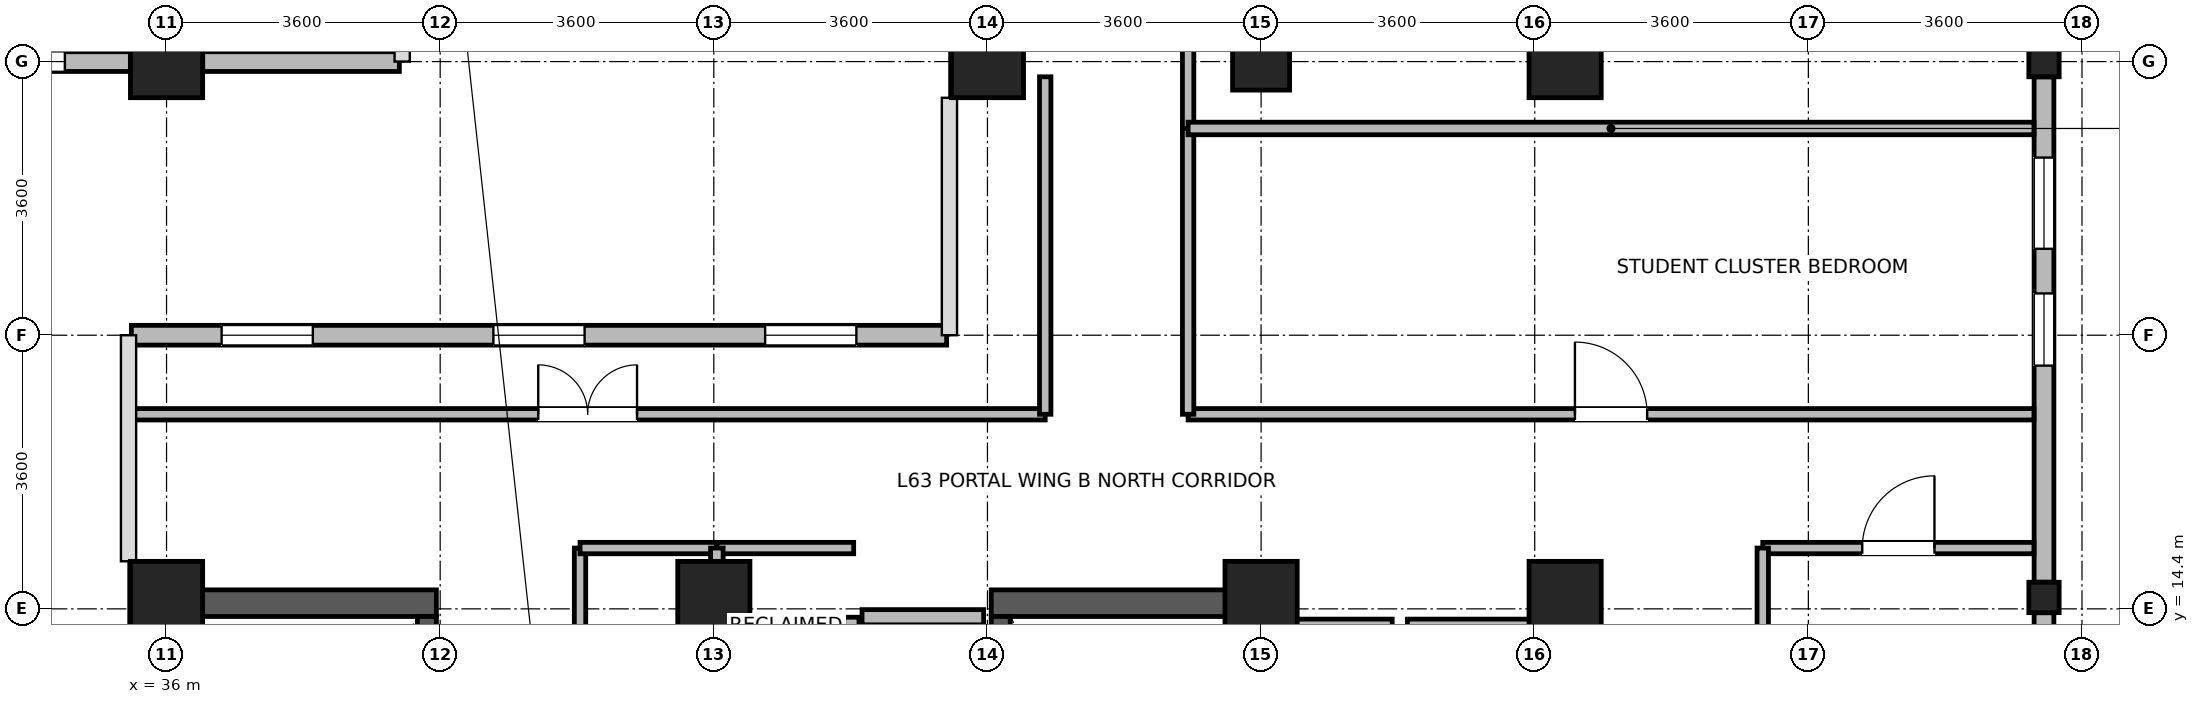
"""IFC4 building model, lengths in metres.
Left out: names, types, materials, properties, quantities, classifications, styles, units other than length and angle.
Written with IfcOpenShell. Run it as: python <this file> out.ifc"""

import sys

from ifc_helpers import new_model, si_unit, direction, frame, frame_2d, origin, origin_2d, place, context, subcontext, project, spatial, rectangle, i_section, extrude, source, transform, mapped, element, fill, save


model = new_model("IFC4")
c1 = context("Model", 3, precision=1e-05, world=origin(), true_north=direction((0.0, 1.0)))
c2 = subcontext(c1, "Body", "Model", "MODEL_VIEW")
j1 = project(units=[si_unit("LENGTHUNIT", "METRE"), si_unit("PLANEANGLEUNIT", "RADIAN")], contexts=[c1])
p1 = place(None, origin())
s1 = spatial("IfcSite", under=j1, at=p1, CompositionType="ELEMENT")
p2 = place(p1, origin())
s2 = spatial("IfcBuilding", under=s1, at=p2, CompositionType="ELEMENT")
p3 = place(p2, frame((0.0, 0.0, 246.2)))
s3 = spatial("IfcBuildingStorey", under=s2, at=p3, CompositionType="ELEMENT", Elevation=246.2)
for number, where, z_axis, x_axis in (
    (1, (36.175, 6.95, 0.0), (0.0, 0.0, 1.0), (0.0, 1.0, 0.0)),
    (2, (50.225, 6.95, 0.0), (0.0, 0.0, 1.0), (0.0, 1.0, 0.0)),
):
    element("IfcWall", number, at=place(p3, frame(where, z_axis=z_axis, x_axis=x_axis)), inside=s3, PredefinedType="SHEAR", context=c2, shape_type="SweptSolid", body=[
        extrude(rectangle(XDim=7.7, YDim=0.35, at=frame_2d((3.85, 0.0))), origin(), (0.0, 0.0, 1.0), 3.28),
    ])
for number, where, z_axis, x_axis in (
    (3, (36.35, 14.475, 0.0), (0.0, 0.0, 1.0), (1.0, 0.0, 0.0)),
    (4, (46.85, 14.475, 0.0), (0.0, 0.0, 1.0), (1.0, 0.0, 0.0)),
):
    element("IfcWall", number, at=place(p3, frame(where, z_axis=z_axis, x_axis=x_axis)), inside=s3, PredefinedType="SHEAR", context=c2, shape_type="SweptSolid", body=[
        extrude(rectangle(XDim=3.2, YDim=0.35, at=frame_2d((1.6, 0.0))), origin(), (0.0, 0.0, 1.0), 3.28),
    ])
p4 = place(p3, frame((39.425, 7.3, 0.0), z_axis=(0.0, 0.0, 1.0), x_axis=(0.0, 1.0, 0.0)))
e5 = element("IfcWall", 5, at=p4, inside=s3, PredefinedType="SHEAR", context=c2, shape_type="SweptSolid", body=[
    extrude(rectangle(XDim=7.0, YDim=0.25, at=frame_2d((3.5, 0.0))), origin(), (0.0, 0.0, 1.0), 3.28),
])
p5 = place(p4, frame((0.15, 0.0, 0.0)))
e6 = element("IfcOpeningElement", 6, at=p5, cuts=e5, PredefinedType="OPENING", context=c2, shape_type="SweptSolid", body=[
    extrude(rectangle(XDim=1.1, YDim=2.08, at=frame_2d((0.55, 1.04))), frame((0.0, 0.135, 0.0), z_axis=(0.0, -1.0, 0.0), x_axis=(1.0, 0.0, 0.0)), (0.0, 0.0, 1.0), 0.27),
])
p6 = place(p3, frame((46.975, 7.3, 0.0), z_axis=(0.0, 0.0, 1.0), x_axis=(0.0, 1.0, 0.0)))
e7 = element("IfcWall", 7, at=p6, inside=s3, PredefinedType="SHEAR", context=c2, shape_type="SweptSolid", body=[
    extrude(rectangle(XDim=7.0, YDim=0.25, at=frame_2d((3.5, 0.0))), origin(), (0.0, 0.0, 1.0), 3.28),
])
p7 = place(p6, frame((0.15, 0.0, 0.0)))
e8 = element("IfcOpeningElement", 8, at=p7, cuts=e7, PredefinedType="OPENING", context=c2, shape_type="SweptSolid", body=[
    extrude(rectangle(XDim=1.1, YDim=2.08, at=frame_2d((0.55, 1.04))), frame((0.0, 0.135, 0.0), z_axis=(0.0, -1.0, 0.0), x_axis=(1.0, 0.0, 0.0)), (0.0, 0.0, 1.0), 0.27),
])
m1 = source(origin(), c2, "Body", "SweptSolid", [
    extrude(rectangle(XDim=0.95, YDim=0.95, at=origin_2d()), origin(), (0.0, 0.0, 1.0), 3.7),
])
for number, where, z_axis, x_axis in (
    (9, (36.0, 21.6, 0.0), (0.0, 0.0, 1.0), (1.0, 0.0, 0.0)),
    (10, (46.8, 21.6, 0.0), (0.0, 0.0, 1.0), (1.0, 0.0, 0.0)),
    (11, (36.0, 14.55, 0.0), (0.0, 0.0, 1.0), (1.0, 0.0, 0.0)),
    (12, (43.2, 14.55, 0.0), (0.0, 0.0, 1.0), (1.0, 0.0, 0.0)),
    (13, (50.4, 14.55, 0.0), (0.0, 0.0, 1.0), (1.0, 0.0, 0.0)),
):
    element("IfcColumn", number, at=place(p3, frame(where, z_axis=z_axis, x_axis=x_axis)), inside=s3, PredefinedType="COLUMN", context=c2, shape_type="MappedRepresentation", body=[
        mapped(m1, transform((0.0, 0.0, 0.0), x_axis=(1.0, 0.0, 0.0), y_axis=(0.0, 1.0, 0.0), z_axis=(0.0, 0.0, 1.0), scale=1.0)),
    ])
m2 = source(origin(), c2, "Body", "SweptSolid", [
    extrude(rectangle(XDim=0.75, YDim=0.75, at=origin_2d()), origin(), (0.0, 0.0, 1.0), 3.7),
])
p8 = place(p3, frame((50.4, 21.6, 0.0), z_axis=(0.0, 0.0, 1.0), x_axis=(1.0, 0.0, 0.0)))
e14 = element("IfcColumn", 14, at=p8, inside=s3, PredefinedType="PILASTER", context=c2, shape_type="MappedRepresentation", body=[
    mapped(m2, transform((0.0, 0.0, 0.0), x_axis=(1.0, 0.0, 0.0), y_axis=(0.0, 1.0, 0.0), z_axis=(0.0, 0.0, 1.0), scale=1.0)),
])
for number, where, z_axis, x_axis in (
    (15, (54.4, 14.55, 0.0), (0.0, 0.0, 1.0), (1.0, 0.0, 0.0)),
    (16, (54.4, 21.6, 0.0), (0.0, 0.0, 1.0), (1.0, 0.0, 0.0)),
):
    element("IfcColumn", number, at=place(p3, frame(where, z_axis=z_axis, x_axis=x_axis)), inside=s3, PredefinedType="COLUMN", context=c2, shape_type="MappedRepresentation", body=[
        mapped(m1, transform((0.0, 0.0, 0.0), x_axis=(1.0, 0.0, 0.0), y_axis=(0.0, 1.0, 0.0), z_axis=(0.0, 0.0, 1.0), scale=1.0)),
    ])
m3 = source(origin(), c2, "Body", "SweptSolid", [
    extrude(i_section(OverallWidth=0.399, OverallDepth=0.4, WebThickness=0.017, FlangeThickness=0.023, FilletRadius=0.015, at=origin_2d()), origin(), (0.0, 0.0, 1.0), 3.7),
])
for number, where, z_axis, x_axis in (
    (17, (60.7, 14.55, 0.0), (0.0, 0.0, 1.0), (1.0, 0.0, 0.0)),
    (18, (60.7, 21.6, 0.0), (0.0, 0.0, 1.0), (1.0, 0.0, 0.0)),
):
    element("IfcColumn", number, at=place(p3, frame(where, z_axis=z_axis, x_axis=x_axis)), inside=s3, PredefinedType="COLUMN", context=c2, shape_type="MappedRepresentation", body=[
        mapped(m3, transform((0.0, 0.0, 0.0), x_axis=(1.0, 0.0, 0.0), y_axis=(0.0, 1.0, 0.0), z_axis=(0.0, 0.0, 1.0), scale=1.0)),
    ])
p9 = place(p3, frame((35.524, 21.6, 0.0), z_axis=(0.0, 0.0, 1.0), x_axis=(-1.0, 0.0, 0.0)))
e19 = element("IfcWall", 19, at=p9, inside=s3, PredefinedType="STANDARD", context=c2, shape_type="SweptSolid", body=[
    extrude(rectangle(XDim=2.923, YDim=0.26, at=frame_2d((1.462, 0.0))), origin(), (0.0, 0.0, 1.0), 2.86),
])
p10 = place(p9, frame((0.862, 0.0, 0.85)))
e20 = element("IfcOpeningElement", 20, at=p10, cuts=e19, PredefinedType="OPENING", context=c2, shape_type="SweptSolid", body=[
    extrude(rectangle(XDim=1.2, YDim=1.75, at=frame_2d((0.6, 0.875))), frame((0.0, 0.14, 0.0), z_axis=(0.0, -1.0, 0.0), x_axis=(1.0, 0.0, 0.0)), (0.0, 0.0, 1.0), 0.28),
])
p11 = place(p3, frame((39.063, 21.6, 0.0), z_axis=(0.0, 0.0, 1.0), x_axis=(-1.0, 0.0, 0.0)))
e21 = element("IfcWall", 21, at=p11, inside=s3, PredefinedType="STANDARD", context=c2, shape_type="SweptSolid", body=[
    extrude(rectangle(XDim=2.587, YDim=0.26, at=frame_2d((1.293, 0.0))), origin(), (0.0, 0.0, 1.0), 1.46),
])
p12 = place(p3, frame((60.7, 14.349, 0.0), z_axis=(0.0, 0.0, 1.0), x_axis=(0.0, -1.0, 0.0)))
e22 = element("IfcWall", 22, at=p12, inside=s3, PredefinedType="STANDARD", context=c2, shape_type="SweptSolid", body=[
    extrude(rectangle(XDim=5.079, YDim=0.26, at=frame_2d((2.54, 0.0))), origin(), (0.0, 0.0, 1.0), 2.86),
])
p13 = place(p12, frame((1.939, 0.0, 0.85)))
e23 = element("IfcOpeningElement", 23, at=p13, cuts=e22, PredefinedType="OPENING", context=c2, shape_type="SweptSolid", body=[
    extrude(rectangle(XDim=1.2, YDim=1.75, at=frame_2d((0.6, 0.875))), frame((0.0, 0.14, 0.0), z_axis=(0.0, -1.0, 0.0), x_axis=(1.0, 0.0, 0.0)), (0.0, 0.0, 1.0), 0.28),
])
p14 = place(p3, frame((60.7, 21.399, 0.0), z_axis=(0.0, 0.0, 1.0), x_axis=(0.0, -1.0, 0.0)))
e24 = element("IfcWall", 24, at=p14, inside=s3, PredefinedType="STANDARD", context=c2, shape_type="SweptSolid", body=[
    extrude(rectangle(XDim=6.648, YDim=0.26, at=frame_2d((3.324, 0.0))), origin(), (0.0, 0.0, 1.0), 2.86),
])
p15 = place(p14, frame((1.062, 0.0, 0.85)))
e25 = element("IfcOpeningElement", 25, at=p15, cuts=e24, PredefinedType="OPENING", context=c2, shape_type="SweptSolid", body=[
    extrude(rectangle(XDim=1.2, YDim=1.75, at=frame_2d((0.6, 0.875))), frame((0.0, 0.14, 0.0), z_axis=(0.0, -1.0, 0.0), x_axis=(1.0, 0.0, 0.0)), (0.0, 0.0, 1.0), 0.28),
])
p16 = place(p14, frame((2.849, 0.0, 0.85)))
e26 = element("IfcOpeningElement", 26, at=p16, cuts=e24, PredefinedType="OPENING", context=c2, shape_type="SweptSolid", body=[
    extrude(rectangle(XDim=0.95, YDim=1.75, at=frame_2d((0.475, 0.875))), frame((0.0, 0.14, 0.0), z_axis=(0.0, -1.0, 0.0), x_axis=(1.0, 0.0, 0.0)), (0.0, 0.0, 1.0), 0.28),
])
p17 = place(p3, frame((35.537, 18.0, 0.0), z_axis=(0.0, 0.0, 1.0), x_axis=(1.0, 0.0, 0.0)))
e27 = element("IfcWall", 27, at=p17, inside=s3, PredefinedType="STANDARD", context=c2, shape_type="SweptSolid", body=[
    extrude(rectangle(XDim=10.726, YDim=0.26, at=frame_2d((5.363, 0.0))), origin(), (0.0, 0.0, 1.0), 3.26),
])
p18 = place(p17, frame((1.188, 0.0, 0.85)))
e28 = element("IfcOpeningElement", 28, at=p18, cuts=e27, PredefinedType="OPENING", context=c2, shape_type="SweptSolid", body=[
    extrude(rectangle(XDim=1.2, YDim=1.75, at=frame_2d((0.6, 0.875))), frame((0.0, 0.14, 0.0), z_axis=(0.0, -1.0, 0.0), x_axis=(1.0, 0.0, 0.0)), (0.0, 0.0, 1.0), 0.28),
])
p19 = place(p17, frame((4.763, 0.0, 0.85)))
e29 = element("IfcOpeningElement", 29, at=p19, cuts=e27, PredefinedType="OPENING", context=c2, shape_type="SweptSolid", body=[
    extrude(rectangle(XDim=1.2, YDim=1.75, at=frame_2d((0.6, 0.875))), frame((0.0, 0.14, 0.0), z_axis=(0.0, -1.0, 0.0), x_axis=(1.0, 0.0, 0.0)), (0.0, 0.0, 1.0), 0.28),
])
p20 = place(p17, frame((8.338, 0.0, 0.85)))
e30 = element("IfcOpeningElement", 30, at=p20, cuts=e27, PredefinedType="OPENING", context=c2, shape_type="SweptSolid", body=[
    extrude(rectangle(XDim=1.2, YDim=1.75, at=frame_2d((0.6, 0.875))), frame((0.0, 0.14, 0.0), z_axis=(0.0, -1.0, 0.0), x_axis=(1.0, 0.0, 0.0)), (0.0, 0.0, 1.0), 0.28),
])
p21 = place(p3, frame((50.475, 14.165, 0.0), z_axis=(0.0, 0.0, 1.0), x_axis=(1.0, 0.0, 0.0)))
e31 = element("IfcWall", 31, at=p21, inside=s3, PredefinedType="PARTITIONING", context=c2, shape_type="SweptSolid", body=[
    extrude(rectangle(XDim=1.65, YDim=0.2, at=frame_2d((0.825, 0.0))), origin(), (0.0, 0.0, 1.0), 3.26),
])
p22 = place(p3, frame((52.325, 14.165, 0.0), z_axis=(0.0, 0.0, 1.0), x_axis=(1.0, 0.0, 0.0)))
e32 = element("IfcWall", 32, at=p22, inside=s3, PredefinedType="PARTITIONING", context=c2, shape_type="SweptSolid", body=[
    extrude(rectangle(XDim=1.65, YDim=0.2, at=frame_2d((0.825, 0.0))), origin(), (0.0, 0.0, 1.0), 3.26),
])
p23 = place(p3, frame((45.15, 14.29, 0.0), z_axis=(0.0, 0.0, 1.0), x_axis=(1.0, 0.0, 0.0)))
e33 = element("IfcWall", 33, at=p23, inside=s3, PredefinedType="PARTITIONING", context=c2, shape_type="SweptSolid", body=[
    extrude(rectangle(XDim=1.6, YDim=0.2, at=frame_2d((0.8, 0.0))), origin(), (0.0, 0.0, 1.0), 2.36),
])
p24 = place(p3, frame((45.01, 11.61, 0.0), z_axis=(0.0, 0.0, 1.0), x_axis=(0.0, 1.0, 0.0)))
e34 = element("IfcWall", 34, at=p24, inside=s3, PredefinedType="PARTITIONING", context=c2, shape_type="SweptSolid", body=[
    extrude(rectangle(XDim=2.68, YDim=0.2, at=frame_2d((1.34, 0.0))), origin(), (0.0, 0.0, 1.0), 3.26),
])
p25 = place(p3, frame((35.52, 16.96, 0.0), z_axis=(0.0, 0.0, 1.0), x_axis=(1.0, 0.0, 0.0)))
e35 = element("IfcWall", 35, at=p25, inside=s3, PredefinedType="PARTITIONING", context=c2, shape_type="SweptSolid", body=[
    extrude(rectangle(XDim=12.04, YDim=0.15, at=frame_2d((6.02, 0.0))), origin(), (0.0, 0.0, 1.0), 3.26),
])
p26 = place(p25, frame((5.37, 0.0, 0.0)))
e36 = element("IfcOpeningElement", 36, at=p26, cuts=e35, PredefinedType="OPENING", context=c2, shape_type="SweptSolid", body=[
    extrude(rectangle(XDim=1.3, YDim=2.12, at=frame_2d((0.65, 1.06))), frame((0.0, 0.085, 0.0), z_axis=(0.0, -1.0, 0.0), x_axis=(1.0, 0.0, 0.0)), (0.0, 0.0, 1.0), 0.17),
])
p27 = place(p3, frame((49.44, 16.96, 0.0), z_axis=(0.0, 0.0, 1.0), x_axis=(1.0, 0.0, 0.0)))
e37 = element("IfcWall", 37, at=p27, inside=s3, PredefinedType="PARTITIONING", context=c2, shape_type="SweptSolid", body=[
    extrude(rectangle(XDim=11.128, YDim=0.15, at=frame_2d((5.564, 0.0))), origin(), (0.0, 0.0, 1.0), 3.26),
])
p28 = place(p27, frame((5.089, 0.0, 0.0)))
e38 = element("IfcOpeningElement", 38, at=p28, cuts=e37, PredefinedType="OPENING", context=c2, shape_type="SweptSolid", body=[
    extrude(rectangle(XDim=0.95, YDim=2.1, at=frame_2d((0.475, 1.05))), frame((0.0, 0.085, 0.0), z_axis=(0.0, -1.0, 0.0), x_axis=(1.0, 0.0, 0.0)), (0.0, 0.0, 1.0), 0.17),
])
p29 = place(p3, frame((47.56, 16.96, 0.0), z_axis=(0.0, 0.0, 1.0), x_axis=(0.0, 1.0, 0.0)))
e39 = element("IfcWall", 39, at=p29, inside=s3, PredefinedType="PARTITIONING", context=c2, shape_type="SweptSolid", body=[
    extrude(rectangle(XDim=4.44, YDim=0.15, at=frame_2d((2.22, 0.0))), origin(), (0.0, 0.0, 1.0), 3.26),
])
p30 = place(p3, frame((49.44, 20.72, 0.0), z_axis=(0.0, 0.0, 1.0), x_axis=(0.0, 1.0, 0.0)))
e40 = element("IfcWall", 40, at=p30, inside=s3, PredefinedType="PARTITIONING", context=c2, shape_type="SweptSolid", body=[
    extrude(rectangle(XDim=3.78, YDim=0.15, at=frame_2d((1.89, 0.0))), origin(), (0.0, 0.0, 1.0), 3.26),
])
p31 = place(p30, frame((1.415, 0.0, 0.0)))
e41 = element("IfcOpeningElement", 41, at=p31, cuts=e40, PredefinedType="OPENING", context=c2, shape_type="SweptSolid", body=[
    extrude(rectangle(XDim=0.95, YDim=2.1, at=frame_2d((0.475, 1.05))), frame((0.0, 0.085, 0.0), z_axis=(0.0, -1.0, 0.0), x_axis=(1.0, 0.0, 0.0)), (0.0, 0.0, 1.0), 0.17),
])
p32 = place(p3, frame((49.44, 16.96, 0.0), z_axis=(0.0, 0.0, 1.0), x_axis=(0.0, 1.0, 0.0)))
e42 = element("IfcWall", 42, at=p32, inside=s3, PredefinedType="PARTITIONING", context=c2, shape_type="SweptSolid", body=[
    extrude(rectangle(XDim=3.76, YDim=0.15, at=frame_2d((1.88, 0.0))), origin(), (0.0, 0.0, 1.0), 3.26),
])
p33 = place(p3, frame((57.0, 15.2, 0.0), z_axis=(0.0, 0.0, 1.0), x_axis=(1.0, 0.0, 0.0)))
e43 = element("IfcWall", 43, at=p33, inside=s3, PredefinedType="PARTITIONING", context=c2, shape_type="SweptSolid", body=[
    extrude(rectangle(XDim=3.568, YDim=0.15, at=frame_2d((1.784, 0.0))), origin(), (0.0, 0.0, 1.0), 3.26),
])
p34 = place(p33, frame((1.309, 0.0, 0.0)))
e44 = element("IfcOpeningElement", 44, at=p34, cuts=e43, PredefinedType="OPENING", context=c2, shape_type="SweptSolid", body=[
    extrude(rectangle(XDim=0.95, YDim=2.1, at=frame_2d((0.475, 1.05))), frame((0.0, 0.085, 0.0), z_axis=(0.0, -1.0, 0.0), x_axis=(1.0, 0.0, 0.0)), (0.0, 0.0, 1.0), 0.17),
])
p35 = place(p3, frame((41.44, 11.64, 0.0), z_axis=(0.0, 0.0, 1.0), x_axis=(0.0, 1.0, 0.0)))
e45 = element("IfcWall", 45, at=p35, inside=s3, PredefinedType="PARTITIONING", context=c2, shape_type="SweptSolid", body=[
    extrude(rectangle(XDim=3.56, YDim=0.15, at=frame_2d((1.78, 0.0))), origin(), (0.0, 0.0, 1.0), 3.26),
])
p36 = place(p35, frame((1.13, 0.0, 0.0)))
e46 = element("IfcOpeningElement", 46, at=p36, cuts=e45, PredefinedType="OPENING", context=c2, shape_type="SweptSolid", body=[
    extrude(rectangle(XDim=1.3, YDim=2.12, at=frame_2d((0.65, 1.06))), frame((0.0, 0.085, 0.0), z_axis=(0.0, -1.0, 0.0), x_axis=(1.0, 0.0, 0.0)), (0.0, 0.0, 1.0), 0.17),
])
p37 = place(p3, frame((57.0, 11.96, 0.0), z_axis=(0.0, 0.0, 1.0), x_axis=(0.0, 1.0, 0.0)))
e47 = element("IfcWall", 47, at=p37, inside=s3, PredefinedType="PARTITIONING", context=c2, shape_type="SweptSolid", body=[
    extrude(rectangle(XDim=3.24, YDim=0.15, at=frame_2d((1.62, 0.0))), origin(), (0.0, 0.0, 1.0), 3.26),
])
for number, where, z_axis, x_axis in (
    (48, (41.44, 15.2, 0.0), (0.0, 0.0, 1.0), (1.0, 0.0, 0.0)),
    (49, (43.24, 15.2, 0.0), (0.0, 0.0, 1.0), (1.0, 0.0, 0.0)),
):
    element("IfcWall", number, at=place(p3, frame(where, z_axis=z_axis, x_axis=x_axis)), inside=s3, PredefinedType="PARTITIONING", context=c2, shape_type="SweptSolid", body=[
        extrude(rectangle(XDim=1.8, YDim=0.15, at=frame_2d((0.9, 0.0))), origin(), (0.0, 0.0, 1.0), 3.26),
    ])
p38 = place(p3, frame((49.44, 20.72, 0.0), z_axis=(0.0, 0.0, 1.0), x_axis=(1.0, 0.0, 0.0)))
e50 = element("IfcWall", 50, at=p38, inside=s3, PredefinedType="PARTITIONING", context=c2, shape_type="SweptSolid", body=[
    extrude(rectangle(XDim=11.128, YDim=0.165, at=frame_2d((5.564, 0.0))), origin(), (0.0, 0.0, 1.0), 3.26),
])
p39 = place(p3, frame((43.24, 11.64, 0.0), z_axis=(0.0, 0.0, 1.0), x_axis=(0.0, 1.0, 0.0)))
e51 = element("IfcWall", 51, at=p39, inside=s3, PredefinedType="PARTITIONING", context=c2, shape_type="SweptSolid", body=[
    extrude(rectangle(XDim=3.56, YDim=0.165, at=frame_2d((1.78, 0.0))), origin(), (0.0, 0.0, 1.0), 3.26),
])
p40 = place(p10, origin())
e52 = element("IfcWindow", 52, at=p40, inside=s3, PartitioningType="SINGLE_PANEL", PredefinedType="WINDOW", context=c2, shape_type="SweptSolid", body=[
    extrude(rectangle(XDim=1.2, YDim=1.75, at=frame_2d((0.6, 0.875))), frame((0.0, 0.03, 0.0), z_axis=(0.0, -1.0, 0.0), x_axis=(1.0, 0.0, 0.0)), (0.0, 0.0, 1.0), 0.06),
])
fill(e20, e52)
p41 = place(p15, origin())
e53 = element("IfcWindow", 53, at=p41, inside=s3, PartitioningType="SINGLE_PANEL", PredefinedType="WINDOW", context=c2, shape_type="SweptSolid", body=[
    extrude(rectangle(XDim=1.2, YDim=1.75, at=frame_2d((0.6, 0.875))), frame((0.0, 0.03, 0.0), z_axis=(0.0, -1.0, 0.0), x_axis=(1.0, 0.0, 0.0)), (0.0, 0.0, 1.0), 0.06),
])
fill(e25, e53)
p42 = place(p16, origin())
e54 = element("IfcWindow", 54, at=p42, inside=s3, PartitioningType="SINGLE_PANEL", PredefinedType="WINDOW", context=c2, shape_type="SweptSolid", body=[
    extrude(rectangle(XDim=0.95, YDim=1.75, at=frame_2d((0.475, 0.875))), frame((0.0, 0.03, 0.0), z_axis=(0.0, -1.0, 0.0), x_axis=(1.0, 0.0, 0.0)), (0.0, 0.0, 1.0), 0.06),
])
fill(e26, e54)
p43 = place(p18, origin())
e55 = element("IfcWindow", 55, at=p43, inside=s3, PartitioningType="SINGLE_PANEL", PredefinedType="WINDOW", context=c2, shape_type="SweptSolid", body=[
    extrude(rectangle(XDim=1.2, YDim=1.75, at=frame_2d((0.6, 0.875))), frame((0.0, 0.03, 0.0), z_axis=(0.0, -1.0, 0.0), x_axis=(1.0, 0.0, 0.0)), (0.0, 0.0, 1.0), 0.06),
])
fill(e28, e55)
p44 = place(p19, origin())
e56 = element("IfcWindow", 56, at=p44, inside=s3, PartitioningType="SINGLE_PANEL", PredefinedType="WINDOW", context=c2, shape_type="SweptSolid", body=[
    extrude(rectangle(XDim=1.2, YDim=1.75, at=frame_2d((0.6, 0.875))), frame((0.0, 0.03, 0.0), z_axis=(0.0, -1.0, 0.0), x_axis=(1.0, 0.0, 0.0)), (0.0, 0.0, 1.0), 0.06),
])
fill(e29, e56)
p45 = place(p20, origin())
e57 = element("IfcWindow", 57, at=p45, inside=s3, PartitioningType="SINGLE_PANEL", PredefinedType="WINDOW", context=c2, shape_type="SweptSolid", body=[
    extrude(rectangle(XDim=1.2, YDim=1.75, at=frame_2d((0.6, 0.875))), frame((0.0, 0.03, 0.0), z_axis=(0.0, -1.0, 0.0), x_axis=(1.0, 0.0, 0.0)), (0.0, 0.0, 1.0), 0.06),
])
fill(e30, e57)
p46 = place(p26, origin())
e58 = element("IfcDoor", 58, at=p46, inside=s3, OperationType="DOUBLE_DOOR_SINGLE_SWING", PredefinedType="DOOR", context=c2, shape_type="SweptSolid", body=[
    extrude(rectangle(XDim=1.3, YDim=2.12, at=frame_2d((0.65, 1.06))), frame((0.0, 0.025, 0.0), z_axis=(0.0, -1.0, 0.0), x_axis=(1.0, 0.0, 0.0)), (0.0, 0.0, 1.0), 0.05),
])
fill(e36, e58)
p47 = place(p28, origin())
e59 = element("IfcDoor", 59, at=p47, inside=s3, OperationType="SINGLE_SWING_LEFT", PredefinedType="DOOR", context=c2, shape_type="SweptSolid", body=[
    extrude(rectangle(XDim=0.95, YDim=2.1, at=frame_2d((0.475, 1.05))), frame((0.0, 0.025, 0.0), z_axis=(0.0, -1.0, 0.0), x_axis=(1.0, 0.0, 0.0)), (0.0, 0.0, 1.0), 0.05),
])
fill(e38, e59)
p48 = place(p34, origin())
e60 = element("IfcDoor", 60, at=p48, inside=s3, OperationType="SINGLE_SWING_RIGHT", PredefinedType="DOOR", context=c2, shape_type="SweptSolid", body=[
    extrude(rectangle(XDim=0.95, YDim=2.1, at=frame_2d((0.475, 1.05))), frame((0.0, 0.025, 0.0), z_axis=(0.0, -1.0, 0.0), x_axis=(1.0, 0.0, 0.0)), (0.0, 0.0, 1.0), 0.05),
])
fill(e44, e60)
save(model, sys.argv[1])
